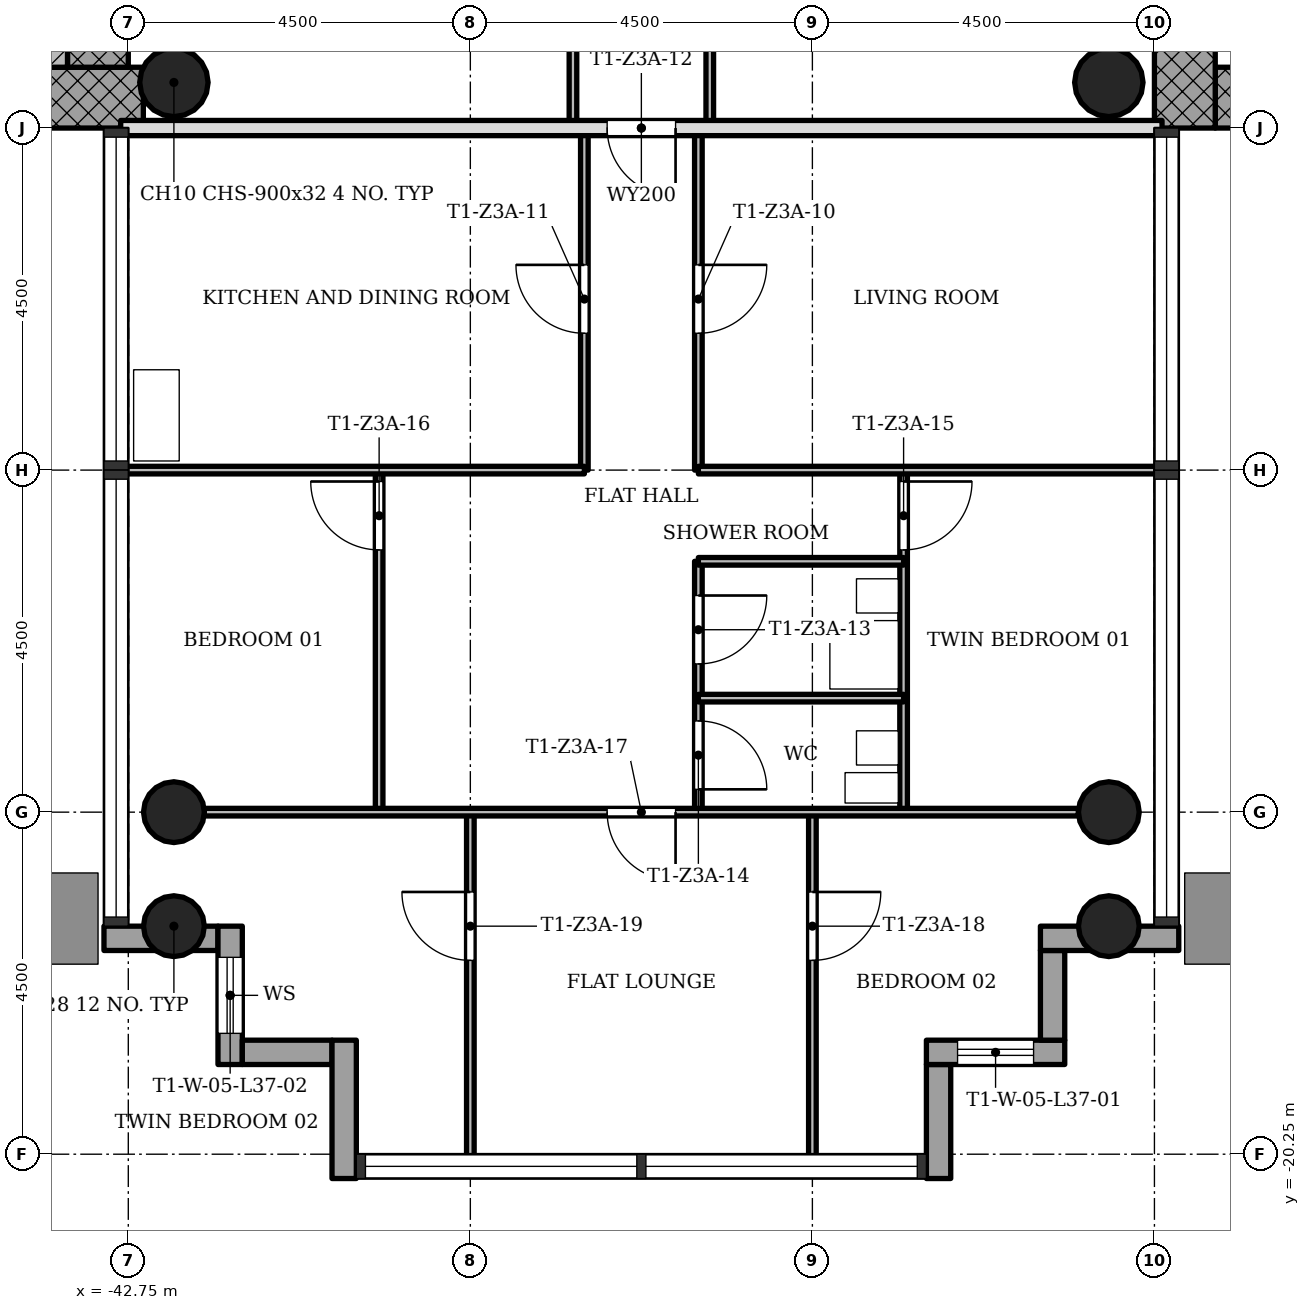
"""IFC4 building model, lengths in metres.
Left out: names, types, materials, properties, quantities, classifications, styles, units other than length and angle.
Written with IfcOpenShell. Run it as: python <this file> out.ifc"""

import sys

from ifc_helpers import new_model, si_unit, direction, frame, frame_2d, origin, origin_2d, place, context, subcontext, project, spatial, rectangle, hollow_circle, extrude, element, fill, save


model = new_model("IFC4")
c1 = context("Model", 3, precision=1e-05, world=origin(), true_north=direction((0.0, 1.0)))
c2 = subcontext(c1, "Body", "Model", "MODEL_VIEW")
j1 = project(units=[si_unit("LENGTHUNIT", "METRE"), si_unit("PLANEANGLEUNIT", "RADIAN")], contexts=[c1])
p1 = place(None, origin())
s1 = spatial("IfcSite", under=j1, at=p1, CompositionType="ELEMENT")
p2 = place(p1, origin())
s2 = spatial("IfcBuilding", under=s1, at=p2, CompositionType="ELEMENT")
p3 = place(p2, frame((0.0, 0.0, 137.1)))
s3 = spatial("IfcBuildingStorey", under=s2, at=p3, CompositionType="ELEMENT", Elevation=137.1)
p4 = place(p3, frame((-28.45, -6.35, 0.0), z_axis=(0.0, 0.0, 1.0), x_axis=(1.0, 0.0, 0.0)))
e1 = element("IfcWall", 1, at=p4, inside=s3, PredefinedType="SHEAR", context=c2, shape_type="SweptSolid", body=[
    extrude(rectangle(XDim=8.2, YDim=0.8, at=frame_2d((4.1, 0.0))), origin(), (0.0, 0.0, 1.0), 3.4),
])
p5 = place(p3, frame((-28.85, 5.95, 0.0), z_axis=(0.0, 0.0, 1.0), x_axis=(0.0, -1.0, 0.0)))
e2 = element("IfcWall", 2, at=p5, inside=s3, PredefinedType="SHEAR", context=c2, shape_type="SweptSolid", body=[
    extrude(rectangle(XDim=12.7, YDim=0.8, at=frame_2d((6.35, 0.0))), origin(), (0.0, 0.0, 1.0), 3.4),
])
p6 = place(p5, frame((5.05, 0.0, 0.0)))
e3 = element("IfcOpeningElement", 3, at=p6, cuts=e2, PredefinedType="OPENING", context=c2, shape_type="SweptSolid", body=[
    extrude(rectangle(XDim=1.8, YDim=2.1, at=frame_2d((0.9, 1.05))), frame((0.0, 0.41, 0.0), z_axis=(0.0, -1.0, 0.0), x_axis=(1.0, 0.0, 0.0)), (0.0, 0.0, 1.0), 0.82),
])
p7 = place(p3, frame((-50.95, -6.35, 0.0), z_axis=(0.0, 0.0, 1.0), x_axis=(1.0, 0.0, 0.0)))
e4 = element("IfcWall", 4, at=p7, inside=s3, PredefinedType="SHEAR", context=c2, shape_type="SweptSolid", body=[
    extrude(rectangle(XDim=8.398, YDim=0.8, at=frame_2d((4.199, 0.0))), origin(), (0.0, 0.0, 1.0), 3.4),
])
p8 = place(p3, frame((-43.15, -5.95, 0.0), z_axis=(0.0, 0.0, 1.0), x_axis=(0.0, 1.0, 0.0)))
e5 = element("IfcWall", 5, at=p8, inside=s3, PredefinedType="SHEAR", context=c2, shape_type="SweptSolid", body=[
    extrude(rectangle(XDim=12.7, YDim=0.8, at=frame_2d((6.35, 0.0))), origin(), (0.0, 0.0, 1.0), 3.4),
])
p9 = place(p8, frame((5.05, 0.0, 0.0)))
e6 = element("IfcOpeningElement", 6, at=p9, cuts=e5, PredefinedType="OPENING", context=c2, shape_type="SweptSolid", body=[
    extrude(rectangle(XDim=1.8, YDim=2.1, at=frame_2d((0.9, 1.05))), frame((0.0, 0.41, 0.0), z_axis=(0.0, -1.0, 0.0), x_axis=(1.0, 0.0, 0.0)), (0.0, 0.0, 1.0), 0.82),
])
for number, where, z_axis, x_axis in (
    (7, (-42.15, -15.75, 0.0), (0.0, 0.0, 1.0), (1.0, 0.0, 0.0)),
    (8, (-29.85, -15.75, 0.0), (0.0, 0.0, 1.0), (1.0, 0.0, 0.0)),
    (9, (-42.15, -17.25, 0.0), (0.0, 0.0, 1.0), (1.0, 0.0, 0.0)),
    (10, (-29.85, -17.25, 0.0), (0.0, 0.0, 1.0), (1.0, 0.0, 0.0)),
):
    element("IfcColumn", number, at=place(p3, frame(where, z_axis=z_axis, x_axis=x_axis)), inside=s3, PredefinedType="COLUMN", context=c2, shape_type="SweptSolid", body=[
        extrude(hollow_circle(Radius=0.4, WallThickness=0.028, at=origin_2d()), origin(), (0.0, 0.0, 1.0), 3.4),
    ])
for number, where, z_axis, x_axis in (
    (11, (-42.15, -6.15, 0.0), (0.0, 0.0, 1.0), (1.0, 0.0, 0.0)),
    (12, (-29.85, -6.15, 0.0), (0.0, 0.0, 1.0), (1.0, 0.0, 0.0)),
):
    element("IfcColumn", number, at=place(p3, frame(where, z_axis=z_axis, x_axis=x_axis)), inside=s3, PredefinedType="COLUMN", context=c2, shape_type="SweptSolid", body=[
        extrude(hollow_circle(Radius=0.45, WallThickness=0.032, at=origin_2d()), origin(), (0.0, 0.0, 1.0), 3.4),
    ])
p10 = place(p3, frame((-43.07, -17.41, -0.3), z_axis=(0.0, 0.0, 1.0), x_axis=(1.0, 0.0, 0.0)))
e13 = element("IfcWall", 13, at=p10, inside=s3, PredefinedType="STANDARD", context=c2, shape_type="SweptSolid", body=[
    extrude(rectangle(XDim=1.5, YDim=0.32, at=frame_2d((0.75, 0.0))), origin(), (0.0, 0.0, 1.0), 3.4),
])
p11 = place(p3, frame((-41.41, -17.25, -0.3), z_axis=(0.0, 0.0, 1.0), x_axis=(0.0, -1.0, 0.0)))
e14 = element("IfcWall", 14, at=p11, inside=s3, PredefinedType="STANDARD", context=c2, shape_type="SweptSolid", body=[
    extrude(rectangle(XDim=1.82, YDim=0.32, at=frame_2d((0.91, 0.0))), origin(), (0.0, 0.0, 1.0), 3.4),
])
p12 = place(p11, frame((0.41, 0.0, 1.2)))
e15 = element("IfcOpeningElement", 15, at=p12, cuts=e14, PredefinedType="OPENING", context=c2, shape_type="SweptSolid", body=[
    extrude(rectangle(XDim=1.0, YDim=1.5, at=frame_2d((0.5, 0.75))), frame((0.0, 0.17, 0.0), z_axis=(0.0, -1.0, 0.0), x_axis=(1.0, 0.0, 0.0)), (0.0, 0.0, 1.0), 0.34),
])
p13 = place(p3, frame((-41.25, -18.91, -0.3), z_axis=(0.0, 0.0, 1.0), x_axis=(1.0, 0.0, 0.0)))
e16 = element("IfcWall", 16, at=p13, inside=s3, PredefinedType="STANDARD", context=c2, shape_type="SweptSolid", body=[
    extrude(rectangle(XDim=1.18, YDim=0.32, at=frame_2d((0.59, 0.0))), origin(), (0.0, 0.0, 1.0), 3.4),
])
p14 = place(p3, frame((-39.91, -18.75, -0.3), z_axis=(0.0, 0.0, 1.0), x_axis=(0.0, -1.0, 0.0)))
e17 = element("IfcWall", 17, at=p14, inside=s3, PredefinedType="STANDARD", context=c2, shape_type="SweptSolid", body=[
    extrude(rectangle(XDim=1.82, YDim=0.32, at=frame_2d((0.91, 0.0))), origin(), (0.0, 0.0, 1.0), 3.4),
])
p15 = place(p3, frame((-32.09, -20.57, -0.3), z_axis=(0.0, 0.0, 1.0), x_axis=(0.0, 1.0, 0.0)))
e18 = element("IfcWall", 18, at=p15, inside=s3, PredefinedType="STANDARD", context=c2, shape_type="SweptSolid", body=[
    extrude(rectangle(XDim=1.5, YDim=0.32, at=frame_2d((0.75, 0.0))), origin(), (0.0, 0.0, 1.0), 3.4),
])
p16 = place(p3, frame((-32.25, -18.91, -0.3), z_axis=(0.0, 0.0, 1.0), x_axis=(1.0, 0.0, 0.0)))
e19 = element("IfcWall", 19, at=p16, inside=s3, PredefinedType="STANDARD", context=c2, shape_type="SweptSolid", body=[
    extrude(rectangle(XDim=1.82, YDim=0.32, at=frame_2d((0.91, 0.0))), origin(), (0.0, 0.0, 1.0), 3.4),
])
p17 = place(p16, frame((0.41, 0.0, 1.2)))
e20 = element("IfcOpeningElement", 20, at=p17, cuts=e19, PredefinedType="OPENING", context=c2, shape_type="SweptSolid", body=[
    extrude(rectangle(XDim=1.0, YDim=1.5, at=frame_2d((0.5, 0.75))), frame((0.0, 0.17, 0.0), z_axis=(0.0, -1.0, 0.0), x_axis=(1.0, 0.0, 0.0)), (0.0, 0.0, 1.0), 0.34),
])
p18 = place(p3, frame((-30.59, -18.75, -0.3), z_axis=(0.0, 0.0, 1.0), x_axis=(0.0, 1.0, 0.0)))
e21 = element("IfcWall", 21, at=p18, inside=s3, PredefinedType="STANDARD", context=c2, shape_type="SweptSolid", body=[
    extrude(rectangle(XDim=1.18, YDim=0.32, at=frame_2d((0.59, 0.0))), origin(), (0.0, 0.0, 1.0), 3.4),
])
p19 = place(p3, frame((-30.75, -17.41, -0.3), z_axis=(0.0, 0.0, 1.0), x_axis=(1.0, 0.0, 0.0)))
e22 = element("IfcWall", 22, at=p19, inside=s3, PredefinedType="STANDARD", context=c2, shape_type="SweptSolid", body=[
    extrude(rectangle(XDim=1.82, YDim=0.32, at=frame_2d((0.91, 0.0))), origin(), (0.0, 0.0, 1.0), 3.4),
])
p20 = place(p3, frame((-39.45, -15.75, 0.0), z_axis=(0.0, 0.0, 1.0), x_axis=(0.0, 1.0, 0.0)))
e23 = element("IfcWall", 23, at=p20, inside=s3, PredefinedType="PARTITIONING", context=c2, shape_type="SweptSolid", body=[
    extrude(rectangle(XDim=4.5, YDim=0.1, at=frame_2d((2.25, 0.0))), origin(), (0.0, 0.0, 1.0), 3.0),
])
p21 = place(p20, frame((3.45, 0.0, 0.0)))
e24 = element("IfcOpeningElement", 24, at=p21, cuts=e23, PredefinedType="OPENING", context=c2, shape_type="SweptSolid", body=[
    extrude(rectangle(XDim=0.9, YDim=2.1, at=frame_2d((0.45, 1.05))), frame((0.0, 0.06, 0.0), z_axis=(0.0, -1.0, 0.0), x_axis=(1.0, 0.0, 0.0)), (0.0, 0.0, 1.0), 0.12),
])
p22 = place(p3, frame((-38.25, -20.35, 0.0), z_axis=(0.0, 0.0, 1.0), x_axis=(0.0, 1.0, 0.0)))
e25 = element("IfcWall", 25, at=p22, inside=s3, PredefinedType="PARTITIONING", context=c2, shape_type="SweptSolid", body=[
    extrude(rectangle(XDim=4.6, YDim=0.1, at=frame_2d((2.3, 0.0))), origin(), (0.0, 0.0, 1.0), 3.0),
])
p23 = place(p22, frame((2.65, 0.0, 0.0)))
e26 = element("IfcOpeningElement", 26, at=p23, cuts=e25, PredefinedType="OPENING", context=c2, shape_type="SweptSolid", body=[
    extrude(rectangle(XDim=0.9, YDim=2.1, at=frame_2d((0.45, 1.05))), frame((0.0, 0.06, 0.0), z_axis=(0.0, -1.0, 0.0), x_axis=(1.0, 0.0, 0.0)), (0.0, 0.0, 1.0), 0.12),
])
p24 = place(p3, frame((-36.9, -6.75, 0.0), z_axis=(0.0, 0.0, 1.0), x_axis=(0.0, 1.0, 0.0)))
e27 = element("IfcWall", 27, at=p24, inside=s3, PredefinedType="PARTITIONING", context=c2, shape_type="SweptSolid", body=[
    extrude(rectangle(XDim=2.25, YDim=0.1, at=frame_2d((1.125, 0.0))), origin(), (0.0, 0.0, 1.0), 3.0),
])
p25 = place(p3, frame((-36.75, -11.25, 0.0), z_axis=(0.0, 0.0, 1.0), x_axis=(0.0, 1.0, 0.0)))
e28 = element("IfcWall", 28, at=p25, inside=s3, PredefinedType="PARTITIONING", context=c2, shape_type="SweptSolid", body=[
    extrude(rectangle(XDim=4.5, YDim=0.1, at=frame_2d((2.25, 0.0))), origin(), (0.0, 0.0, 1.0), 3.0),
])
p26 = place(p25, frame((1.8, 0.0, 0.0)))
e29 = element("IfcOpeningElement", 29, at=p26, cuts=e28, PredefinedType="OPENING", context=c2, shape_type="SweptSolid", body=[
    extrude(rectangle(XDim=0.9, YDim=2.1, at=frame_2d((0.45, 1.05))), frame((0.0, 0.06, 0.0), z_axis=(0.0, -1.0, 0.0), x_axis=(1.0, 0.0, 0.0)), (0.0, 0.0, 1.0), 0.12),
])
p27 = place(p3, frame((-35.25, -15.75, 0.0), z_axis=(0.0, 0.0, 1.0), x_axis=(0.0, 1.0, 0.0)))
e30 = element("IfcWall", 30, at=p27, inside=s3, PredefinedType="PARTITIONING", context=c2, shape_type="SweptSolid", body=[
    extrude(rectangle(XDim=3.3, YDim=0.1, at=frame_2d((1.65, 0.0))), origin(), (0.0, 0.0, 1.0), 3.0),
])
p28 = place(p27, frame((1.95, 0.0, 0.0)))
e31 = element("IfcOpeningElement", 31, at=p28, cuts=e30, PredefinedType="OPENING", context=c2, shape_type="SweptSolid", body=[
    extrude(rectangle(XDim=0.9, YDim=2.1, at=frame_2d((0.45, 1.05))), frame((0.0, 0.06, 0.0), z_axis=(0.0, -1.0, 0.0), x_axis=(1.0, 0.0, 0.0)), (0.0, 0.0, 1.0), 0.12),
])
p29 = place(p27, frame((0.3, 0.0, 0.0)))
e32 = element("IfcOpeningElement", 32, at=p29, cuts=e30, PredefinedType="OPENING", context=c2, shape_type="SweptSolid", body=[
    extrude(rectangle(XDim=0.9, YDim=2.1, at=frame_2d((0.45, 1.05))), frame((0.0, 0.06, 0.0), z_axis=(0.0, -1.0, 0.0), x_axis=(1.0, 0.0, 0.0)), (0.0, 0.0, 1.0), 0.12),
])
p30 = place(p3, frame((-35.25, -11.25, 0.0), z_axis=(0.0, 0.0, 1.0), x_axis=(0.0, 1.0, 0.0)))
e33 = element("IfcWall", 33, at=p30, inside=s3, PredefinedType="PARTITIONING", context=c2, shape_type="SweptSolid", body=[
    extrude(rectangle(XDim=4.5, YDim=0.1, at=frame_2d((2.25, 0.0))), origin(), (0.0, 0.0, 1.0), 3.0),
])
p31 = place(p30, frame((1.8, 0.0, 0.0)))
e34 = element("IfcOpeningElement", 34, at=p31, cuts=e33, PredefinedType="OPENING", context=c2, shape_type="SweptSolid", body=[
    extrude(rectangle(XDim=0.9, YDim=2.1, at=frame_2d((0.45, 1.05))), frame((0.0, 0.06, 0.0), z_axis=(0.0, -1.0, 0.0), x_axis=(1.0, 0.0, 0.0)), (0.0, 0.0, 1.0), 0.12),
])
p32 = place(p3, frame((-35.1, -6.75, 0.0), z_axis=(0.0, 0.0, 1.0), x_axis=(0.0, 1.0, 0.0)))
e35 = element("IfcWall", 35, at=p32, inside=s3, PredefinedType="PARTITIONING", context=c2, shape_type="SweptSolid", body=[
    extrude(rectangle(XDim=2.25, YDim=0.1, at=frame_2d((1.125, 0.0))), origin(), (0.0, 0.0, 1.0), 3.0),
])
p33 = place(p3, frame((-33.75, -20.35, 0.0), z_axis=(0.0, 0.0, 1.0), x_axis=(0.0, 1.0, 0.0)))
e36 = element("IfcWall", 36, at=p33, inside=s3, PredefinedType="PARTITIONING", context=c2, shape_type="SweptSolid", body=[
    extrude(rectangle(XDim=4.6, YDim=0.1, at=frame_2d((2.3, 0.0))), origin(), (0.0, 0.0, 1.0), 3.0),
])
p34 = place(p33, frame((2.65, 0.0, 0.0)))
e37 = element("IfcOpeningElement", 37, at=p34, cuts=e36, PredefinedType="OPENING", context=c2, shape_type="SweptSolid", body=[
    extrude(rectangle(XDim=0.9, YDim=2.1, at=frame_2d((0.45, 1.05))), frame((0.0, 0.06, 0.0), z_axis=(0.0, -1.0, 0.0), x_axis=(1.0, 0.0, 0.0)), (0.0, 0.0, 1.0), 0.12),
])
p35 = place(p3, frame((-32.55, -15.75, 0.0), z_axis=(0.0, 0.0, 1.0), x_axis=(0.0, 1.0, 0.0)))
e38 = element("IfcWall", 38, at=p35, inside=s3, PredefinedType="PARTITIONING", context=c2, shape_type="SweptSolid", body=[
    extrude(rectangle(XDim=4.5, YDim=0.1, at=frame_2d((2.25, 0.0))), origin(), (0.0, 0.0, 1.0), 3.0),
])
p36 = place(p35, frame((3.45, 0.0, 0.0)))
e39 = element("IfcOpeningElement", 39, at=p36, cuts=e38, PredefinedType="OPENING", context=c2, shape_type="SweptSolid", body=[
    extrude(rectangle(XDim=0.9, YDim=2.1, at=frame_2d((0.45, 1.05))), frame((0.0, 0.06, 0.0), z_axis=(0.0, -1.0, 0.0), x_axis=(1.0, 0.0, 0.0)), (0.0, 0.0, 1.0), 0.12),
])
p37 = place(p3, frame((-41.75, -15.75, 0.0), z_axis=(0.0, 0.0, 1.0), x_axis=(1.0, 0.0, 0.0)))
e40 = element("IfcWall", 40, at=p37, inside=s3, PredefinedType="PARTITIONING", context=c2, shape_type="SweptSolid", body=[
    extrude(rectangle(XDim=11.5, YDim=0.1, at=frame_2d((5.75, 0.0))), origin(), (0.0, 0.0, 1.0), 3.0),
])
p38 = place(p37, frame((5.3, 0.0, 0.0)))
e41 = element("IfcOpeningElement", 41, at=p38, cuts=e40, PredefinedType="OPENING", context=c2, shape_type="SweptSolid", body=[
    extrude(rectangle(XDim=0.9, YDim=2.1, at=frame_2d((0.45, 1.05))), frame((0.0, 0.06, 0.0), z_axis=(0.0, -1.0, 0.0), x_axis=(1.0, 0.0, 0.0)), (0.0, 0.0, 1.0), 0.12),
])
for number, where, z_axis, x_axis in (
    (42, (-35.25, -14.25, 0.0), (0.0, 0.0, 1.0), (1.0, 0.0, 0.0)),
    (43, (-35.25, -12.45, 0.0), (0.0, 0.0, 1.0), (1.0, 0.0, 0.0)),
):
    element("IfcWall", number, at=place(p3, frame(where, z_axis=z_axis, x_axis=x_axis)), inside=s3, PredefinedType="PARTITIONING", context=c2, shape_type="SweptSolid", body=[
        extrude(rectangle(XDim=2.7, YDim=0.1, at=frame_2d((1.35, 0.0))), origin(), (0.0, 0.0, 1.0), 3.0),
    ])
for number, where, z_axis, x_axis in (
    (44, (-42.85, -11.25, 0.0), (0.0, 0.0, 1.0), (1.0, 0.0, 0.0)),
    (45, (-35.25, -11.25, 0.0), (0.0, 0.0, 1.0), (1.0, 0.0, 0.0)),
):
    element("IfcWall", number, at=place(p3, frame(where, z_axis=z_axis, x_axis=x_axis)), inside=s3, PredefinedType="PARTITIONING", context=c2, shape_type="SweptSolid", body=[
        extrude(rectangle(XDim=6.1, YDim=0.1, at=frame_2d((3.05, 0.0))), origin(), (0.0, 0.0, 1.0), 3.0),
    ])
p39 = place(p3, frame((-42.85, -6.75, 0.0), z_axis=(0.0, 0.0, 1.0), x_axis=(1.0, 0.0, 0.0)))
e46 = element("IfcWall", 46, at=p39, inside=s3, PredefinedType="SOLIDWALL", context=c2, shape_type="SweptSolid", body=[
    extrude(rectangle(XDim=13.7, YDim=0.2, at=frame_2d((6.85, 0.0))), origin(), (0.0, 0.0, 1.0), 3.0),
])
p40 = place(p39, frame((6.4, 0.0, 0.0)))
e47 = element("IfcOpeningElement", 47, at=p40, cuts=e46, PredefinedType="OPENING", context=c2, shape_type="SweptSolid", body=[
    extrude(rectangle(XDim=0.9, YDim=2.1, at=frame_2d((0.45, 1.05))), frame((0.0, 0.11, 0.0), z_axis=(0.0, -1.0, 0.0), x_axis=(1.0, 0.0, 0.0)), (0.0, 0.0, 1.0), 0.22),
])
p41 = place(p3, frame((-43.75, -1.85, 0.0), z_axis=(0.0, 0.0, 1.0), x_axis=(0.0, -1.0, 0.0)))
e48 = element("IfcWall", 48, at=p41, inside=s3, PredefinedType="SHEAR", context=c2, shape_type="SweptSolid", body=[
    extrude(rectangle(XDim=4.1, YDim=0.4, at=frame_2d((2.05, 0.0))), origin(), (0.0, 0.0, 1.0), 3.4),
])
p42 = place(p31, origin())
e49 = element("IfcDoor", 49, at=p42, inside=s3, OperationType="SINGLE_SWING_RIGHT", PredefinedType="DOOR", context=c2, shape_type="SweptSolid", body=[
    extrude(rectangle(XDim=0.9, YDim=2.1, at=frame_2d((0.45, 1.05))), frame((0.0, 0.025, 0.0), z_axis=(0.0, -1.0, 0.0), x_axis=(1.0, 0.0, 0.0)), (0.0, 0.0, 1.0), 0.05),
])
fill(e34, e49)
p43 = place(p26, origin())
e50 = element("IfcDoor", 50, at=p43, inside=s3, OperationType="SINGLE_SWING_LEFT", PredefinedType="DOOR", context=c2, shape_type="SweptSolid", body=[
    extrude(rectangle(XDim=0.9, YDim=2.1, at=frame_2d((0.45, 1.05))), frame((0.0, 0.025, 0.0), z_axis=(0.0, -1.0, 0.0), x_axis=(1.0, 0.0, 0.0)), (0.0, 0.0, 1.0), 0.05),
])
fill(e29, e50)
p44 = place(p40, origin())
e51 = element("IfcDoor", 51, at=p44, inside=s3, OperationType="SINGLE_SWING_RIGHT", PredefinedType="DOOR", context=c2, shape_type="SweptSolid", body=[
    extrude(rectangle(XDim=0.9, YDim=2.1, at=frame_2d((0.45, 1.05))), frame((0.0, 0.025, 0.0), z_axis=(0.0, -1.0, 0.0), x_axis=(1.0, 0.0, 0.0)), (0.0, 0.0, 1.0), 0.05),
])
fill(e47, e51)
p45 = place(p28, origin())
e52 = element("IfcDoor", 52, at=p45, inside=s3, OperationType="SINGLE_SWING_RIGHT", PredefinedType="DOOR", context=c2, shape_type="SweptSolid", body=[
    extrude(rectangle(XDim=0.9, YDim=2.1, at=frame_2d((0.45, 1.05))), frame((0.0, 0.025, 0.0), z_axis=(0.0, -1.0, 0.0), x_axis=(1.0, 0.0, 0.0)), (0.0, 0.0, 1.0), 0.05),
])
fill(e31, e52)
p46 = place(p29, origin())
e53 = element("IfcDoor", 53, at=p46, inside=s3, OperationType="SINGLE_SWING_LEFT", PredefinedType="DOOR", context=c2, shape_type="SweptSolid", body=[
    extrude(rectangle(XDim=0.9, YDim=2.1, at=frame_2d((0.45, 1.05))), frame((0.0, 0.025, 0.0), z_axis=(0.0, -1.0, 0.0), x_axis=(1.0, 0.0, 0.0)), (0.0, 0.0, 1.0), 0.05),
])
fill(e32, e53)
p47 = place(p36, origin())
e54 = element("IfcDoor", 54, at=p47, inside=s3, OperationType="SINGLE_SWING_RIGHT", PredefinedType="DOOR", context=c2, shape_type="SweptSolid", body=[
    extrude(rectangle(XDim=0.9, YDim=2.1, at=frame_2d((0.45, 1.05))), frame((0.0, 0.025, 0.0), z_axis=(0.0, -1.0, 0.0), x_axis=(1.0, 0.0, 0.0)), (0.0, 0.0, 1.0), 0.05),
])
fill(e39, e54)
p48 = place(p21, origin())
e55 = element("IfcDoor", 55, at=p48, inside=s3, OperationType="SINGLE_SWING_LEFT", PredefinedType="DOOR", context=c2, shape_type="SweptSolid", body=[
    extrude(rectangle(XDim=0.9, YDim=2.1, at=frame_2d((0.45, 1.05))), frame((0.0, 0.025, 0.0), z_axis=(0.0, -1.0, 0.0), x_axis=(1.0, 0.0, 0.0)), (0.0, 0.0, 1.0), 0.05),
])
fill(e24, e55)
p49 = place(p38, origin())
e56 = element("IfcDoor", 56, at=p49, inside=s3, OperationType="SINGLE_SWING_RIGHT", PredefinedType="DOOR", context=c2, shape_type="SweptSolid", body=[
    extrude(rectangle(XDim=0.9, YDim=2.1, at=frame_2d((0.45, 1.05))), frame((0.0, 0.025, 0.0), z_axis=(0.0, -1.0, 0.0), x_axis=(1.0, 0.0, 0.0)), (0.0, 0.0, 1.0), 0.05),
])
fill(e41, e56)
p50 = place(p34, origin())
e57 = element("IfcDoor", 57, at=p50, inside=s3, OperationType="SINGLE_SWING_RIGHT", PredefinedType="DOOR", context=c2, shape_type="SweptSolid", body=[
    extrude(rectangle(XDim=0.9, YDim=2.1, at=frame_2d((0.45, 1.05))), frame((0.0, 0.025, 0.0), z_axis=(0.0, -1.0, 0.0), x_axis=(1.0, 0.0, 0.0)), (0.0, 0.0, 1.0), 0.05),
])
fill(e37, e57)
p51 = place(p23, origin())
e58 = element("IfcDoor", 58, at=p51, inside=s3, OperationType="SINGLE_SWING_LEFT", PredefinedType="DOOR", context=c2, shape_type="SweptSolid", body=[
    extrude(rectangle(XDim=0.9, YDim=2.1, at=frame_2d((0.45, 1.05))), frame((0.0, 0.025, 0.0), z_axis=(0.0, -1.0, 0.0), x_axis=(1.0, 0.0, 0.0)), (0.0, 0.0, 1.0), 0.05),
])
fill(e26, e58)
p52 = place(p17, origin())
e59 = element("IfcWindow", 59, at=p52, inside=s3, PartitioningType="SINGLE_PANEL", PredefinedType="WINDOW", context=c2, shape_type="SweptSolid", body=[
    extrude(rectangle(XDim=1.0, YDim=1.5, at=frame_2d((0.5, 0.75))), frame((0.0, 0.03, 0.0), z_axis=(0.0, -1.0, 0.0), x_axis=(1.0, 0.0, 0.0)), (0.0, 0.0, 1.0), 0.06),
])
fill(e20, e59)
p53 = place(p12, origin())
e60 = element("IfcWindow", 60, at=p53, inside=s3, PartitioningType="SINGLE_PANEL", PredefinedType="WINDOW", context=c2, shape_type="SweptSolid", body=[
    extrude(rectangle(XDim=1.0, YDim=1.5, at=frame_2d((0.5, 0.75))), frame((0.0, 0.03, 0.0), z_axis=(0.0, -1.0, 0.0), x_axis=(1.0, 0.0, 0.0)), (0.0, 0.0, 1.0), 0.06),
])
fill(e15, e60)
save(model, sys.argv[1])
